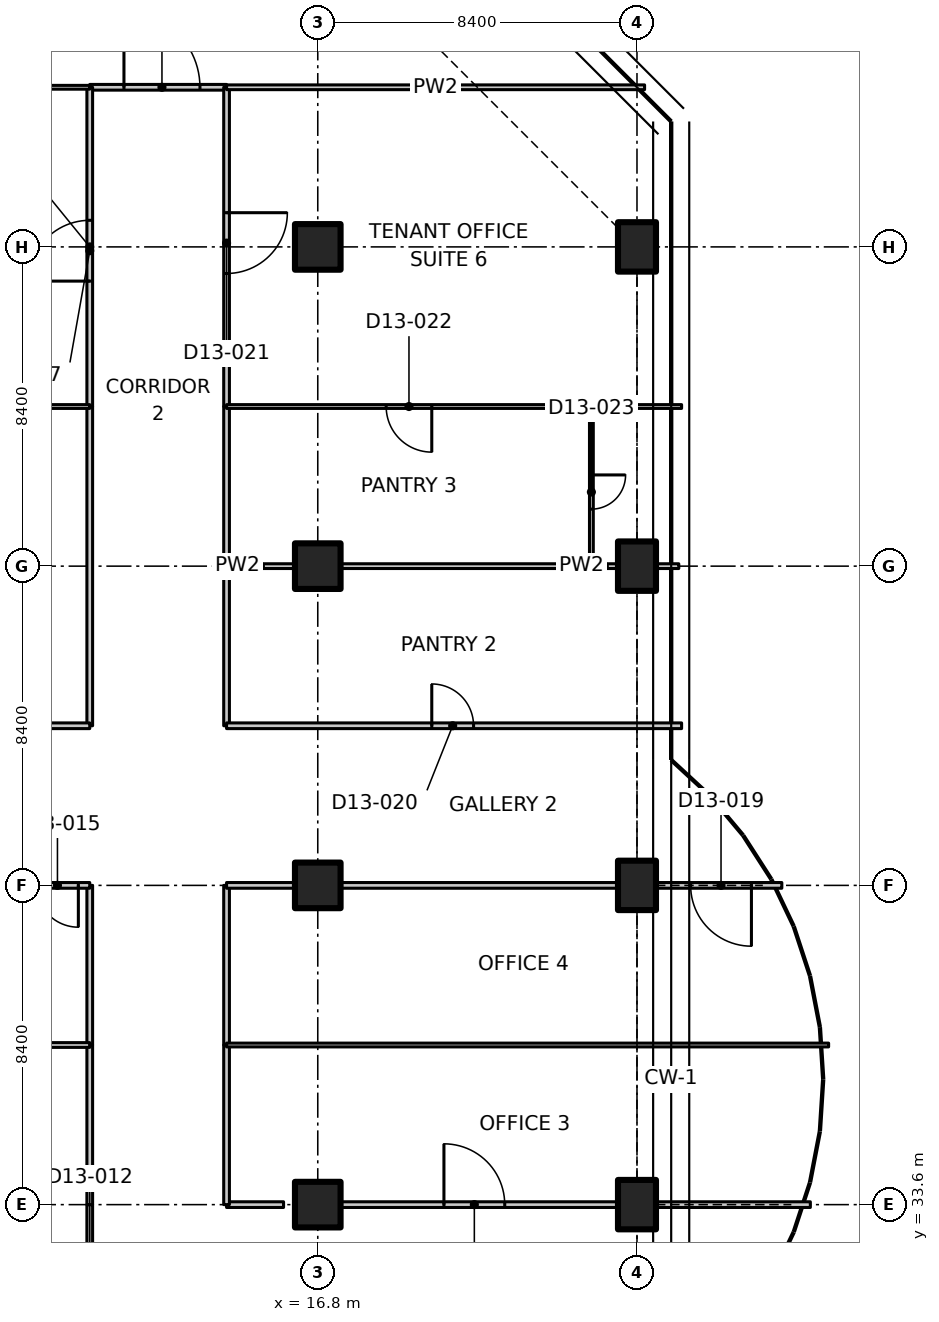
"""IFC4 building model, lengths in metres.
Left out: names, types, materials, properties, quantities, classifications, styles, units other than length and angle.
Written with IfcOpenShell. Run it as: python <this file> out.ifc"""

import sys

from ifc_helpers import new_model, si_unit, direction, frame, frame_2d, origin, origin_2d, place, context, subcontext, project, spatial, polyline, rectangle, outline, extrude, element, fill, save


model = new_model("IFC4")
c1 = context("Model", 3, precision=1e-05, world=origin(), true_north=direction((0.0, 1.0)))
c2 = subcontext(c1, "Body", "Model", "MODEL_VIEW")
j1 = project(units=[si_unit("LENGTHUNIT", "METRE"), si_unit("PLANEANGLEUNIT", "RADIAN")], contexts=[c1])
p1 = place(None, origin())
s1 = spatial("IfcSite", under=j1, at=p1, CompositionType="ELEMENT")
p2 = place(p1, origin())
s2 = spatial("IfcBuilding", under=s1, at=p2, CompositionType="ELEMENT")
p3 = place(p2, frame((0.0, 0.0, 95.3)))
s3 = spatial("IfcBuildingStorey", under=s2, at=p3, CompositionType="ELEMENT", Elevation=95.3)
for number, where, z_axis, x_axis in (
    (1, (16.8, 33.6, 0.0), (0.0, 0.0, 1.0), (1.0, 0.0, 0.0)),
    (2, (16.8, 42.0, 0.0), (0.0, 0.0, 1.0), (1.0, 0.0, 0.0)),
    (3, (16.8, 50.4, 0.0), (0.0, 0.0, 1.0), (1.0, 0.0, 0.0)),
    (4, (16.8, 58.8, 0.0), (0.0, 0.0, 1.0), (1.0, 0.0, 0.0)),
):
    element("IfcColumn", number, at=place(p3, frame(where, z_axis=z_axis, x_axis=x_axis)), inside=s3, PredefinedType="COLUMN", context=c2, shape_type="SweptSolid", body=[
        extrude(rectangle(XDim=1.2, YDim=1.2, at=origin_2d()), origin(), (0.0, 0.0, 1.0), 3.35),
    ])
for number, where, z_axis, x_axis in (
    (5, (25.2, 33.6, 0.0), (0.0, 0.0, 1.0), (1.0, 0.0, 0.0)),
    (6, (25.2, 42.0, 0.0), (0.0, 0.0, 1.0), (1.0, 0.0, 0.0)),
    (7, (25.2, 50.4, 0.0), (0.0, 0.0, 1.0), (1.0, 0.0, 0.0)),
    (8, (25.2, 58.8, 0.0), (0.0, 0.0, 1.0), (1.0, 0.0, 0.0)),
):
    element("IfcColumn", number, at=place(p3, frame(where, z_axis=z_axis, x_axis=x_axis)), inside=s3, PredefinedType="COLUMN", context=c2, shape_type="SweptSolid", body=[
        extrude(rectangle(XDim=1.0, YDim=1.3, at=origin_2d()), origin(), (0.0, 0.0, 1.0), 3.35),
    ])
p4 = place(p3, frame((10.8, 29.4, 0.0), z_axis=(0.0, 0.0, 1.0), x_axis=(0.0, 1.0, 0.0)))
e9 = element("IfcWall", 9, at=p4, inside=s3, PredefinedType="PARTITIONING", context=c2, shape_type="SweptSolid", body=[
    extrude(rectangle(XDim=4.2, YDim=0.15, at=frame_2d((2.1, 0.0))), origin(), (0.0, 0.0, 1.0), 3.33),
])
p5 = place(p4, frame((1.2, 0.0, 0.0)))
e10 = element("IfcOpeningElement", 10, at=p5, cuts=e9, PredefinedType="OPENING", context=c2, shape_type="SweptSolid", body=[
    extrude(rectangle(XDim=1.6, YDim=2.1, at=frame_2d((0.8, 1.05))), frame((0.0, 0.085, 0.0), z_axis=(0.0, -1.0, 0.0), x_axis=(1.0, 0.0, 0.0)), (0.0, 0.0, 1.0), 0.17),
])
p6 = place(p3, frame((14.4, 33.6, 0.0), z_axis=(0.0, 0.0, 1.0), x_axis=(1.0, 0.0, 0.0)))
e11 = element("IfcWall", 11, at=p6, inside=s3, PredefinedType="PARTITIONING", context=c2, shape_type="SweptSolid", body=[
    extrude(rectangle(XDim=1.5, YDim=0.15, at=frame_2d((0.75, 0.0))), origin(), (0.0, 0.0, 1.0), 3.33),
])
p7 = place(p3, frame((17.42, 33.6, 0.0), z_axis=(0.0, 0.0, 1.0), x_axis=(1.0, 0.0, 0.0)))
e12 = element("IfcWall", 12, at=p7, inside=s3, PredefinedType="PARTITIONING", context=c2, shape_type="SweptSolid", body=[
    extrude(rectangle(XDim=7.26, YDim=0.15, at=frame_2d((3.63, 0.0))), origin(), (0.0, 0.0, 1.0), 3.33),
])
p8 = place(p7, frame((2.7, 0.0, 0.0)))
e13 = element("IfcOpeningElement", 13, at=p8, cuts=e12, PredefinedType="OPENING", context=c2, shape_type="SweptSolid", body=[
    extrude(rectangle(XDim=1.6, YDim=2.1, at=frame_2d((0.8, 1.05))), frame((0.0, 0.085, 0.0), z_axis=(0.0, -1.0, 0.0), x_axis=(1.0, 0.0, 0.0)), (0.0, 0.0, 1.0), 0.17),
])
p9 = place(p3, frame((25.72, 33.6, 0.0), z_axis=(0.0, 0.0, 1.0), x_axis=(1.0, 0.0, 0.0)))
e14 = element("IfcWall", 14, at=p9, inside=s3, PredefinedType="PARTITIONING", context=c2, shape_type="SweptSolid", body=[
    extrude(rectangle(XDim=4.042, YDim=0.15, at=frame_2d((2.021, 0.0))), origin(), (0.0, 0.0, 1.0), 2.98),
])
p10 = place(p3, frame((10.8, 63.0, 0.0), z_axis=(0.0, 0.0, 1.0), x_axis=(1.0, 0.0, 0.0)))
e15 = element("IfcWall", 15, at=p10, inside=s3, PredefinedType="PARTITIONING", context=c2, shape_type="SweptSolid", body=[
    extrude(rectangle(XDim=3.6, YDim=0.15, at=frame_2d((1.8, 0.0))), origin(), (0.0, 0.0, 1.0), 3.33),
])
p11 = place(p10, frame((0.9, 0.0, 0.0)))
e16 = element("IfcOpeningElement", 16, at=p11, cuts=e15, PredefinedType="OPENING", context=c2, shape_type="SweptSolid", body=[
    extrude(rectangle(XDim=2.0, YDim=2.4, at=frame_2d((1.0, 1.2))), frame((0.0, 0.085, 0.0), z_axis=(0.0, -1.0, 0.0), x_axis=(1.0, 0.0, 0.0)), (0.0, 0.0, 1.0), 0.17),
])
for number, where, z_axis, x_axis in (
    (17, (10.8, 33.6, 0.0), (0.0, 0.0, 1.0), (0.0, 1.0, 0.0)),
    (18, (10.8, 37.8, 0.0), (0.0, 0.0, 1.0), (0.0, 1.0, 0.0)),
):
    element("IfcWall", number, at=place(p3, frame(where, z_axis=z_axis, x_axis=x_axis)), inside=s3, PredefinedType="PARTITIONING", context=c2, shape_type="SweptSolid", body=[
        extrude(rectangle(XDim=4.2, YDim=0.15, at=frame_2d((2.1, 0.0))), origin(), (0.0, 0.0, 1.0), 3.33),
    ])
p12 = place(p3, frame((10.8, 46.2, 0.0), z_axis=(0.0, 0.0, 1.0), x_axis=(0.0, 1.0, 0.0)))
e19 = element("IfcWall", 19, at=p12, inside=s3, PredefinedType="PARTITIONING", context=c2, shape_type="SweptSolid", body=[
    extrude(rectangle(XDim=8.4, YDim=0.15, at=frame_2d((4.2, 0.0))), origin(), (0.0, 0.0, 1.0), 3.33),
])
p13 = place(p3, frame((10.8, 54.6, 0.0), z_axis=(0.0, 0.0, 1.0), x_axis=(0.0, 1.0, 0.0)))
e20 = element("IfcWall", 20, at=p13, inside=s3, PredefinedType="PARTITIONING", context=c2, shape_type="SweptSolid", body=[
    extrude(rectangle(XDim=8.4, YDim=0.15, at=frame_2d((4.2, 0.0))), origin(), (0.0, 0.0, 1.0), 3.33),
])
p14 = place(p13, frame((3.3, 0.0, 0.0)))
e21 = element("IfcOpeningElement", 21, at=p14, cuts=e20, PredefinedType="OPENING", context=c2, shape_type="SweptSolid", body=[
    extrude(rectangle(XDim=1.6, YDim=2.1, at=frame_2d((0.8, 1.05))), frame((0.0, 0.085, 0.0), z_axis=(0.0, -1.0, 0.0), x_axis=(1.0, 0.0, 0.0)), (0.0, 0.0, 1.0), 0.17),
])
for number, where, z_axis, x_axis in (
    (22, (14.4, 37.8, 0.0), (0.0, 0.0, 1.0), (0.0, -1.0, 0.0)),
    (23, (14.4, 42.0, 0.0), (0.0, 0.0, 1.0), (0.0, -1.0, 0.0)),
    (24, (14.4, 50.4, 0.0), (0.0, 0.0, 1.0), (0.0, -1.0, 0.0)),
):
    element("IfcWall", number, at=place(p3, frame(where, z_axis=z_axis, x_axis=x_axis)), inside=s3, PredefinedType="PARTITIONING", context=c2, shape_type="SweptSolid", body=[
        extrude(rectangle(XDim=4.2, YDim=0.15, at=frame_2d((2.1, 0.0))), origin(), (0.0, 0.0, 1.0), 3.33),
    ])
p15 = place(p3, frame((14.4, 63.0, 0.0), z_axis=(0.0, 0.0, 1.0), x_axis=(0.0, -1.0, 0.0)))
e25 = element("IfcWall", 25, at=p15, inside=s3, PredefinedType="PARTITIONING", context=c2, shape_type="SweptSolid", body=[
    extrude(rectangle(XDim=8.4, YDim=0.15, at=frame_2d((4.2, 0.0))), origin(), (0.0, 0.0, 1.0), 3.33),
])
p16 = place(p15, frame((3.3, 0.0, 0.0)))
e26 = element("IfcOpeningElement", 26, at=p16, cuts=e25, PredefinedType="OPENING", context=c2, shape_type="SweptSolid", body=[
    extrude(rectangle(XDim=1.6, YDim=2.1, at=frame_2d((0.8, 1.05))), frame((0.0, 0.085, 0.0), z_axis=(0.0, -1.0, 0.0), x_axis=(1.0, 0.0, 0.0)), (0.0, 0.0, 1.0), 0.17),
])
p17 = place(p3, frame((14.4, 54.6, 0.0), z_axis=(0.0, 0.0, 1.0), x_axis=(0.0, -1.0, 0.0)))
e27 = element("IfcWall", 27, at=p17, inside=s3, PredefinedType="PARTITIONING", context=c2, shape_type="SweptSolid", body=[
    extrude(rectangle(XDim=4.2, YDim=0.15, at=frame_2d((2.1, 0.0))), origin(), (0.0, 0.0, 1.0), 3.33),
])
p18 = place(p3, frame((10.8, 63.0, 0.0), z_axis=(0.0, 0.0, 1.0), x_axis=(-1.0, 0.0, 0.0)))
e28 = element("IfcWall", 28, at=p18, inside=s3, PredefinedType="PARTITIONING", context=c2, shape_type="SweptSolid", body=[
    extrude(outline(polyline([(0.0, 0.0), (11.0, 0.0), (11.0, 3.33), (7.266, 3.33), (7.264, 2.98), (5.936, 2.98), (5.934, 3.33), (0.0, 3.33), (0.0, 0.0)])), frame((0.0, 0.05, 0.0), z_axis=(0.0, -1.0, 0.0), x_axis=(1.0, 0.0, 0.0)), (0.0, 0.0, 1.0), 0.1),
])
p19 = place(p3, frame((25.4, 63.0, 0.0), z_axis=(0.0, 0.0, 1.0), x_axis=(-1.0, 0.0, 0.0)))
e29 = element("IfcWall", 29, at=p19, inside=s3, PredefinedType="PARTITIONING", context=c2, shape_type="SweptSolid", body=[
    extrude(outline(polyline([(0.0, 0.0), (11.0, 0.0), (11.0, 3.33), (5.078, 3.33), (5.076, 2.98), (3.724, 2.98), (3.722, 3.33), (0.0, 3.33), (0.0, 0.0)])), frame((0.0, 0.062, 0.0), z_axis=(0.0, -1.0, 0.0), x_axis=(1.0, 0.0, 0.0)), (0.0, 0.0, 1.0), 0.125),
])
p20 = place(p3, frame((10.8, 42.0, 0.0), z_axis=(0.0, 0.0, 1.0), x_axis=(-1.0, 0.0, 0.0)))
e30 = element("IfcWall", 30, at=p20, inside=s3, PredefinedType="PARTITIONING", context=c2, shape_type="SweptSolid", body=[
    extrude(rectangle(XDim=1.78, YDim=0.15, at=frame_2d((0.89, 0.0))), origin(), (0.0, 0.0, 1.0), 3.33),
])
p21 = place(p20, frame((0.3, 0.0, 0.0)))
e31 = element("IfcOpeningElement", 31, at=p21, cuts=e30, PredefinedType="OPENING", context=c2, shape_type="SweptSolid", body=[
    extrude(rectangle(XDim=1.1, YDim=2.1, at=frame_2d((0.55, 1.05))), frame((0.0, 0.085, 0.0), z_axis=(0.0, -1.0, 0.0), x_axis=(1.0, 0.0, 0.0)), (0.0, 0.0, 1.0), 0.17),
])
p22 = place(p3, frame((-1.174, 46.2, 0.0), z_axis=(0.0, 0.0, 1.0), x_axis=(1.0, 0.0, 0.0)))
e32 = element("IfcWall", 32, at=p22, inside=s3, PredefinedType="PARTITIONING", context=c2, shape_type="SweptSolid", body=[
    extrude(outline(polyline([(0.0, 0.0), (11.974, 0.0), (11.974, 3.33), (1.624, 3.33), (1.622, 2.98), (0.726, 2.98), (0.724, 3.33), (0.074, 3.33), (0.0, 3.33), (0.0, 0.0)])), frame((0.0, 0.075, 0.0), z_axis=(0.0, -1.0, 0.0), x_axis=(1.0, 0.0, 0.0)), (0.0, 0.0, 1.0), 0.15),
])
p23 = place(p22, frame((5.374, 0.0, 0.0)))
e33 = element("IfcOpeningElement", 33, at=p23, cuts=e32, PredefinedType="OPENING", context=c2, shape_type="SweptSolid", body=[
    extrude(rectangle(XDim=1.6, YDim=2.1, at=frame_2d((0.8, 1.05))), frame((0.0, 0.085, 0.0), z_axis=(0.0, -1.0, 0.0), x_axis=(1.0, 0.0, 0.0)), (0.0, 0.0, 1.0), 0.17),
])
p24 = place(p3, frame((-1.174, 37.8, 0.0), z_axis=(0.0, 0.0, 1.0), x_axis=(1.0, 0.0, 0.0)))
e34 = element("IfcWall", 34, at=p24, inside=s3, PredefinedType="PARTITIONING", context=c2, shape_type="SweptSolid", body=[
    extrude(outline(polyline([(0.0, 0.0), (11.974, 0.0), (11.974, 3.33), (1.624, 3.33), (1.622, 2.98), (0.726, 2.98), (0.724, 3.33), (0.074, 3.33), (0.0, 3.33), (0.0, 0.0)])), frame((0.0, 0.062, 0.0), z_axis=(0.0, -1.0, 0.0), x_axis=(1.0, 0.0, 0.0)), (0.0, 0.0, 1.0), 0.125),
])
p25 = place(p3, frame((-1.174, 54.6, 0.0), z_axis=(0.0, 0.0, 1.0), x_axis=(1.0, 0.0, 0.0)))
e35 = element("IfcWall", 35, at=p25, inside=s3, PredefinedType="PARTITIONING", context=c2, shape_type="SweptSolid", body=[
    extrude(outline(polyline([(0.0, 0.0), (11.974, 0.0), (11.974, 3.33), (1.624, 3.33), (1.622, 2.98), (0.726, 2.98), (0.724, 3.33), (0.074, 3.33), (0.0, 3.33), (0.0, 0.0)])), frame((0.0, 0.05, 0.0), z_axis=(0.0, -1.0, 0.0), x_axis=(1.0, 0.0, 0.0)), (0.0, 0.0, 1.0), 0.1),
])
p26 = place(p3, frame((29.011, 42.0, 0.0), z_axis=(0.0, 0.0, 1.0), x_axis=(-1.0, 0.0, 0.0)))
e36 = element("IfcWall", 36, at=p26, inside=s3, PredefinedType="PARTITIONING", context=c2, shape_type="SweptSolid", body=[
    extrude(rectangle(XDim=3.292, YDim=0.15, at=frame_2d((1.646, 0.0))), origin(), (0.0, 0.0, 1.0), 2.98),
])
p27 = place(p26, frame((0.8, 0.0, 0.0)))
e37 = element("IfcOpeningElement", 37, at=p27, cuts=e36, PredefinedType="OPENING", context=c2, shape_type="SweptSolid", body=[
    extrude(rectangle(XDim=1.6, YDim=2.1, at=frame_2d((0.8, 1.05))), frame((0.0, 0.085, 0.0), z_axis=(0.0, -1.0, 0.0), x_axis=(1.0, 0.0, 0.0)), (0.0, 0.0, 1.0), 0.17),
])
p28 = place(p3, frame((24.68, 42.0, 0.0), z_axis=(0.0, 0.0, 1.0), x_axis=(-1.0, 0.0, 0.0)))
e38 = element("IfcWall", 38, at=p28, inside=s3, PredefinedType="PARTITIONING", context=c2, shape_type="SweptSolid", body=[
    extrude(rectangle(XDim=7.26, YDim=0.15, at=frame_2d((3.63, 0.0))), origin(), (0.0, 0.0, 1.0), 3.33),
])
p29 = place(p3, frame((16.18, 42.0, 0.0), z_axis=(0.0, 0.0, 1.0), x_axis=(-1.0, 0.0, 0.0)))
e39 = element("IfcWall", 39, at=p29, inside=s3, PredefinedType="PARTITIONING", context=c2, shape_type="SweptSolid", body=[
    extrude(rectangle(XDim=1.78, YDim=0.15, at=frame_2d((0.89, 0.0))), origin(), (0.0, 0.0, 1.0), 3.33),
])
p30 = place(p3, frame((14.4, 46.2, 0.0), z_axis=(0.0, 0.0, 1.0), x_axis=(1.0, 0.0, 0.0)))
e40 = element("IfcWall", 40, at=p30, inside=s3, PredefinedType="PARTITIONING", context=c2, shape_type="SweptSolid", body=[
    extrude(outline(polyline([(0.0, 0.0), (11.974, 0.0), (11.974, 3.33), (11.9, 3.33), (11.25, 3.33), (11.248, 2.98), (10.352, 2.98), (10.35, 3.33), (0.0, 3.33), (0.0, 0.0)])), frame((0.0, 0.075, 0.0), z_axis=(0.0, -1.0, 0.0), x_axis=(1.0, 0.0, 0.0)), (0.0, 0.0, 1.0), 0.15),
])
p31 = place(p30, frame((5.4, 0.0, 0.0)))
e41 = element("IfcOpeningElement", 41, at=p31, cuts=e40, PredefinedType="OPENING", context=c2, shape_type="SweptSolid", body=[
    extrude(rectangle(XDim=1.1, YDim=2.1, at=frame_2d((0.55, 1.05))), frame((0.0, 0.085, 0.0), z_axis=(0.0, -1.0, 0.0), x_axis=(1.0, 0.0, 0.0)), (0.0, 0.0, 1.0), 0.17),
])
p32 = place(p3, frame((14.4, 37.8, 0.0), z_axis=(0.0, 0.0, 1.0), x_axis=(1.0, 0.0, 0.0)))
e42 = element("IfcWall", 42, at=p32, inside=s3, PredefinedType="PARTITIONING", context=c2, shape_type="SweptSolid", body=[
    extrude(outline(polyline([(0.0, 0.0), (15.843, 0.0), (15.843, 3.33), (11.25, 3.33), (11.248, 2.98), (10.352, 2.98), (10.35, 3.33), (0.0, 3.33), (0.0, 0.0)])), frame((0.0, 0.05, 0.0), z_axis=(0.0, -1.0, 0.0), x_axis=(1.0, 0.0, 0.0)), (0.0, 0.0, 1.0), 0.1),
])
p33 = place(p3, frame((14.4, 50.4, 0.0), z_axis=(0.0, 0.0, 1.0), x_axis=(1.0, 0.0, 0.0)))
e43 = element("IfcWall", 43, at=p33, inside=s3, PredefinedType="PARTITIONING", context=c2, shape_type="SweptSolid", body=[
    extrude(rectangle(XDim=1.78, YDim=0.125, at=frame_2d((0.89, 0.0))), origin(), (0.0, 0.0, 1.0), 3.33),
])
p34 = place(p3, frame((17.42, 50.4, 0.0), z_axis=(0.0, 0.0, 1.0), x_axis=(1.0, 0.0, 0.0)))
e44 = element("IfcWall", 44, at=p34, inside=s3, PredefinedType="PARTITIONING", context=c2, shape_type="SweptSolid", body=[
    extrude(rectangle(XDim=6.58, YDim=0.125, at=frame_2d((3.29, 0.0))), origin(), (0.0, 0.0, 1.0), 3.33),
])
p35 = place(p3, frame((24.0, 50.4, 0.0), z_axis=(0.0, 0.0, 1.0), x_axis=(1.0, 0.0, 0.0)))
e45 = element("IfcWall", 45, at=p35, inside=s3, PredefinedType="PARTITIONING", context=c2, shape_type="SweptSolid", body=[
    extrude(rectangle(XDim=0.68, YDim=0.125, at=frame_2d((0.34, 0.0))), origin(), (0.0, 0.0, 1.0), 3.33),
])
p36 = place(p3, frame((25.72, 50.4, 0.0), z_axis=(0.0, 0.0, 1.0), x_axis=(1.0, 0.0, 0.0)))
e46 = element("IfcWall", 46, at=p36, inside=s3, PredefinedType="PARTITIONING", context=c2, shape_type="SweptSolid", body=[
    extrude(rectangle(XDim=0.58, YDim=0.125, at=frame_2d((0.29, 0.0))), origin(), (0.0, 0.0, 1.0), 3.33),
])
p37 = place(p3, frame((24.0, 54.6, 0.0), z_axis=(0.0, 0.0, 1.0), x_axis=(-1.0, 0.0, 0.0)))
e47 = element("IfcWall", 47, at=p37, inside=s3, PredefinedType="PARTITIONING", context=c2, shape_type="SweptSolid", body=[
    extrude(rectangle(XDim=9.6, YDim=0.1, at=frame_2d((4.8, 0.0))), origin(), (0.0, 0.0, 1.0), 3.33),
])
p38 = place(p37, frame((4.2, 0.0, 0.0)))
e48 = element("IfcOpeningElement", 48, at=p38, cuts=e47, PredefinedType="OPENING", context=c2, shape_type="SweptSolid", body=[
    extrude(rectangle(XDim=1.2, YDim=2.1, at=frame_2d((0.6, 1.05))), frame((0.0, 0.06, 0.0), z_axis=(0.0, -1.0, 0.0), x_axis=(1.0, 0.0, 0.0)), (0.0, 0.0, 1.0), 0.12),
])
p39 = place(p3, frame((26.374, 54.6, 0.0), z_axis=(0.0, 0.0, 1.0), x_axis=(-1.0, 0.0, 0.0)))
e49 = element("IfcWall", 49, at=p39, inside=s3, PredefinedType="PARTITIONING", context=c2, shape_type="SweptSolid", body=[
    extrude(rectangle(XDim=2.374, YDim=0.1, at=frame_2d((1.187, 0.0))), origin(), (0.0, 0.0, 1.0), 2.98),
])
p40 = place(p3, frame((24.0, 54.6, 0.0), z_axis=(0.0, 0.0, 1.0), x_axis=(0.0, -1.0, 0.0)))
e50 = element("IfcWall", 50, at=p40, inside=s3, PredefinedType="PARTITIONING", context=c2, shape_type="SweptSolid", body=[
    extrude(rectangle(XDim=4.2, YDim=0.1, at=frame_2d((2.1, 0.0))), origin(), (0.0, 0.0, 1.0), 3.33),
])
p41 = place(p40, frame((1.8, 0.0, 0.0)))
e51 = element("IfcOpeningElement", 51, at=p41, cuts=e50, PredefinedType="OPENING", context=c2, shape_type="SweptSolid", body=[
    extrude(rectangle(XDim=0.9, YDim=2.1, at=frame_2d((0.45, 1.05))), frame((0.0, 0.06, 0.0), z_axis=(0.0, -1.0, 0.0), x_axis=(1.0, 0.0, 0.0)), (0.0, 0.0, 1.0), 0.12),
])
p42 = place(p11, origin())
e52 = element("IfcDoor", 52, at=p42, inside=s3, OperationType="DOUBLE_DOOR_SINGLE_SWING", PredefinedType="DOOR", context=c2, shape_type="SweptSolid", body=[
    extrude(rectangle(XDim=2.0, YDim=2.4, at=frame_2d((1.0, 1.2))), frame((0.0, 0.025, 0.0), z_axis=(0.0, -1.0, 0.0), x_axis=(1.0, 0.0, 0.0)), (0.0, 0.0, 1.0), 0.05),
])
fill(e16, e52)
p43 = place(p21, origin())
e53 = element("IfcDoor", 53, at=p43, inside=s3, OperationType="SINGLE_SWING_LEFT", PredefinedType="DOOR", context=c2, shape_type="SweptSolid", body=[
    extrude(rectangle(XDim=1.1, YDim=2.1, at=frame_2d((0.55, 1.05))), frame((0.0, 0.025, 0.0), z_axis=(0.0, -1.0, 0.0), x_axis=(1.0, 0.0, 0.0)), (0.0, 0.0, 1.0), 0.05),
])
fill(e31, e53)
p44 = place(p14, origin())
e54 = element("IfcDoor", 54, at=p44, inside=s3, OperationType="DOUBLE_DOOR_SINGLE_SWING", PredefinedType="DOOR", context=c2, shape_type="SweptSolid", body=[
    extrude(rectangle(XDim=1.6, YDim=2.1, at=frame_2d((0.8, 1.05))), frame((0.0, 0.025, 0.0), z_axis=(0.0, -1.0, 0.0), x_axis=(1.0, 0.0, 0.0)), (0.0, 0.0, 1.0), 0.05),
])
fill(e21, e54)
p45 = place(p8, origin())
e55 = element("IfcDoor", 55, at=p45, inside=s3, OperationType="DOUBLE_DOOR_SINGLE_SWING", PredefinedType="DOOR", context=c2, shape_type="SweptSolid", body=[
    extrude(rectangle(XDim=1.6, YDim=2.1, at=frame_2d((0.8, 1.05))), frame((0.0, 0.025, 0.0), z_axis=(0.0, -1.0, 0.0), x_axis=(1.0, 0.0, 0.0)), (0.0, 0.0, 1.0), 0.05),
])
fill(e13, e55)
p46 = place(p27, origin())
e56 = element("IfcDoor", 56, at=p46, inside=s3, OperationType="DOUBLE_DOOR_SINGLE_SWING", PredefinedType="DOOR", context=c2, shape_type="SweptSolid", body=[
    extrude(rectangle(XDim=1.6, YDim=2.1, at=frame_2d((0.8, 1.05))), frame((0.0, 0.025, 0.0), z_axis=(0.0, -1.0, 0.0), x_axis=(1.0, 0.0, 0.0)), (0.0, 0.0, 1.0), 0.05),
])
fill(e37, e56)
p47 = place(p31, origin())
e57 = element("IfcDoor", 57, at=p47, inside=s3, OperationType="SINGLE_SWING_LEFT", PredefinedType="DOOR", context=c2, shape_type="SweptSolid", body=[
    extrude(rectangle(XDim=1.1, YDim=2.1, at=frame_2d((0.55, 1.05))), frame((0.0, 0.025, 0.0), z_axis=(0.0, -1.0, 0.0), x_axis=(1.0, 0.0, 0.0)), (0.0, 0.0, 1.0), 0.05),
])
fill(e41, e57)
p48 = place(p16, origin())
e58 = element("IfcDoor", 58, at=p48, inside=s3, OperationType="DOUBLE_DOOR_SINGLE_SWING", PredefinedType="DOOR", context=c2, shape_type="SweptSolid", body=[
    extrude(rectangle(XDim=1.6, YDim=2.1, at=frame_2d((0.8, 1.05))), frame((0.0, 0.025, 0.0), z_axis=(0.0, -1.0, 0.0), x_axis=(1.0, 0.0, 0.0)), (0.0, 0.0, 1.0), 0.05),
])
fill(e26, e58)
p49 = place(p38, origin())
e59 = element("IfcDoor", 59, at=p49, inside=s3, OperationType="SINGLE_SWING_LEFT", PredefinedType="DOOR", context=c2, shape_type="SweptSolid", body=[
    extrude(rectangle(XDim=1.2, YDim=2.1, at=frame_2d((0.6, 1.05))), frame((0.0, 0.025, 0.0), z_axis=(0.0, -1.0, 0.0), x_axis=(1.0, 0.0, 0.0)), (0.0, 0.0, 1.0), 0.05),
])
fill(e48, e59)
p50 = place(p41, origin())
e60 = element("IfcDoor", 60, at=p50, inside=s3, OperationType="SINGLE_SWING_LEFT", PredefinedType="DOOR", context=c2, shape_type="SweptSolid", body=[
    extrude(rectangle(XDim=0.9, YDim=2.1, at=frame_2d((0.45, 1.05))), frame((0.0, 0.025, 0.0), z_axis=(0.0, -1.0, 0.0), x_axis=(1.0, 0.0, 0.0)), (0.0, 0.0, 1.0), 0.05),
])
fill(e51, e60)
save(model, sys.argv[1])
